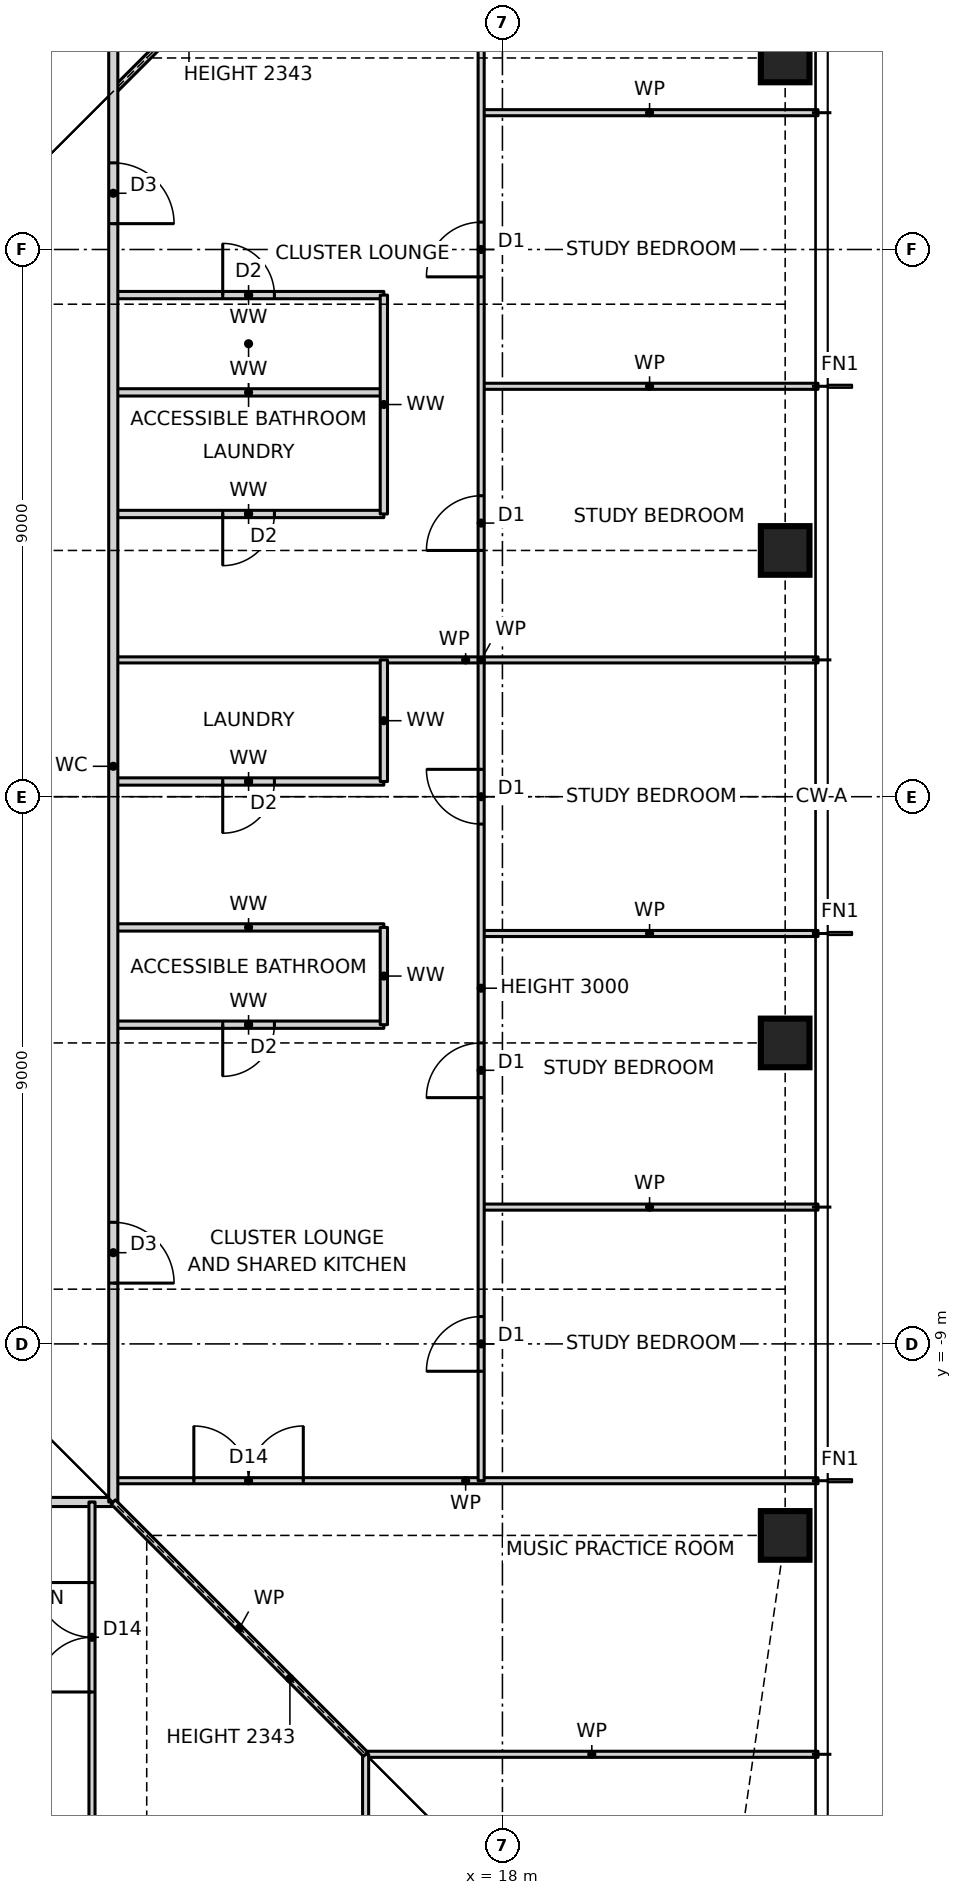
"""IFC4 building model, lengths in metres.
Left out: names, types, materials, properties, quantities, classifications, styles, units other than length and angle.
Written with IfcOpenShell. Run it as: python <this file> out.ifc"""

import sys

from ifc_helpers import new_model, si_unit, direction, frame, frame_2d, origin, origin_2d, place, context, subcontext, project, spatial, rectangle, hollow_rectangle, extrude, element, fill, save


model = new_model("IFC4")
c1 = context("Model", 3, precision=1e-05, world=origin(), true_north=direction((0.0, 1.0)))
c2 = subcontext(c1, "Body", "Model", "MODEL_VIEW")
j1 = project(units=[si_unit("LENGTHUNIT", "METRE"), si_unit("PLANEANGLEUNIT", "RADIAN")], contexts=[c1])
p1 = place(None, origin())
s1 = spatial("IfcSite", under=j1, at=p1, CompositionType="ELEMENT")
p2 = place(p1, origin())
s2 = spatial("IfcBuilding", under=s1, at=p2, CompositionType="ELEMENT")
p3 = place(p2, frame((0.0, 0.0, 36.0)))
s3 = spatial("IfcBuildingStorey", under=s2, at=p3, CompositionType="ELEMENT", Elevation=36.0)
for number, where, z_axis, x_axis in (
    (1, (22.65, -12.15, 0.0), (0.0, 0.0, 1.0), (1.0, 0.0, 0.0)),
    (2, (22.65, -4.05, 0.0), (0.0, 0.0, 1.0), (1.0, 0.0, 0.0)),
    (3, (22.65, 4.05, 0.0), (0.0, 0.0, 1.0), (1.0, 0.0, 0.0)),
    (4, (22.65, 12.15, 0.0), (0.0, 0.0, 1.0), (1.0, 0.0, 0.0)),
):
    element("IfcColumn", number, at=place(p3, frame(where, z_axis=z_axis, x_axis=x_axis)), inside=s3, PredefinedType="COLUMN", context=c2, shape_type="SweptSolid", body=[
        extrude(hollow_rectangle(XDim=0.8, YDim=0.8, WallThickness=0.09, at=origin_2d()), origin(), (0.0, 0.0, 1.0), 3.5),
    ])
p4 = place(p3, frame((15.75, -15.75, 0.0), z_axis=(0.0, 0.0, 1.0), x_axis=(1.0, 0.0, 0.0)))
e5 = element("IfcWall", 5, at=p4, inside=s3, PredefinedType="PARTITIONING", context=c2, shape_type="SweptSolid", body=[
    extrude(rectangle(XDim=7.44, YDim=0.1, at=frame_2d((3.72, 0.0))), origin(), (0.0, 0.0, 1.0), 3.27),
])
p5 = place(p3, frame((-11.6, -11.6, 0.0), z_axis=(0.0, 0.0, 1.0), x_axis=(1.0, 0.0, 0.0)))
e6 = element("IfcWall", 6, at=p5, inside=s3, PredefinedType="PARTITIONING", context=c2, shape_type="SweptSolid", body=[
    extrude(rectangle(XDim=23.2, YDim=0.15, at=frame_2d((11.6, 0.0))), origin(), (0.0, 0.0, 1.0), 3.27),
])
p6 = place(p5, frame((2.975, 0.0, 0.0)))
e7 = element("IfcOpeningElement", 7, at=p6, cuts=e6, PredefinedType="OPENING", context=c2, shape_type="SweptSolid", body=[
    extrude(rectangle(XDim=1.0, YDim=2.1, at=frame_2d((0.5, 1.05))), frame((0.0, 0.085, 0.0), z_axis=(0.0, -1.0, 0.0), x_axis=(1.0, 0.0, 0.0)), (0.0, 0.0, 1.0), 0.17),
])
p7 = place(p5, frame((18.6, 0.0, 0.0)))
e8 = element("IfcOpeningElement", 8, at=p7, cuts=e6, PredefinedType="OPENING", context=c2, shape_type="SweptSolid", body=[
    extrude(rectangle(XDim=1.0, YDim=2.1, at=frame_2d((0.5, 1.05))), frame((0.0, 0.085, 0.0), z_axis=(0.0, -1.0, 0.0), x_axis=(1.0, 0.0, 0.0)), (0.0, 0.0, 1.0), 0.17),
])
p8 = place(p3, frame((11.6, -11.25, 0.0), z_axis=(0.0, 0.0, 1.0), x_axis=(1.0, 0.0, 0.0)))
e9 = element("IfcWall", 9, at=p8, inside=s3, PredefinedType="PARTITIONING", context=c2, shape_type="SweptSolid", body=[
    extrude(rectangle(XDim=11.59, YDim=0.1, at=frame_2d((5.795, 0.0))), origin(), (0.0, 0.0, 1.0), 3.27),
])
p9 = place(p8, frame((1.325, 0.0, 0.0)))
e10 = element("IfcOpeningElement", 10, at=p9, cuts=e9, PredefinedType="OPENING", context=c2, shape_type="SweptSolid", body=[
    extrude(rectangle(XDim=1.8, YDim=2.1, at=frame_2d((0.9, 1.05))), frame((0.0, 0.06, 0.0), z_axis=(0.0, -1.0, 0.0), x_axis=(1.0, 0.0, 0.0)), (0.0, 0.0, 1.0), 0.12),
])
p10 = place(p3, frame((17.65, -6.75, 0.0), z_axis=(0.0, 0.0, 1.0), x_axis=(1.0, 0.0, 0.0)))
e11 = element("IfcWall", 11, at=p10, inside=s3, PredefinedType="PARTITIONING", context=c2, shape_type="SweptSolid", body=[
    extrude(rectangle(XDim=5.54, YDim=0.1, at=frame_2d((2.77, 0.0))), origin(), (0.0, 0.0, 1.0), 3.27),
])
p11 = place(p3, frame((11.6, -3.75, 0.0), z_axis=(0.0, 0.0, 1.0), x_axis=(1.0, 0.0, 0.0)))
e12 = element("IfcWall", 12, at=p11, inside=s3, PredefinedType="PARTITIONING", context=c2, shape_type="SweptSolid", body=[
    extrude(rectangle(XDim=4.45, YDim=0.12, at=frame_2d((2.225, 0.0))), origin(), (0.0, 0.0, 1.0), 3.27),
])
p12 = place(p11, frame((1.8, 0.0, 0.0)))
e13 = element("IfcOpeningElement", 13, at=p12, cuts=e12, PredefinedType="OPENING", context=c2, shape_type="SweptSolid", body=[
    extrude(rectangle(XDim=0.85, YDim=2.1, at=frame_2d((0.425, 1.05))), frame((0.0, 0.07, 0.0), z_axis=(0.0, -1.0, 0.0), x_axis=(1.0, 0.0, 0.0)), (0.0, 0.0, 1.0), 0.14),
])
p13 = place(p3, frame((17.65, -2.25, 0.0), z_axis=(0.0, 0.0, 1.0), x_axis=(1.0, 0.0, 0.0)))
e14 = element("IfcWall", 14, at=p13, inside=s3, PredefinedType="PARTITIONING", context=c2, shape_type="SweptSolid", body=[
    extrude(rectangle(XDim=5.54, YDim=0.1, at=frame_2d((2.77, 0.0))), origin(), (0.0, 0.0, 1.0), 3.27),
])
p14 = place(p3, frame((11.6, -2.15, 0.0), z_axis=(0.0, 0.0, 1.0), x_axis=(1.0, 0.0, 0.0)))
e15 = element("IfcWall", 15, at=p14, inside=s3, PredefinedType="PARTITIONING", context=c2, shape_type="SweptSolid", body=[
    extrude(rectangle(XDim=4.45, YDim=0.12, at=frame_2d((2.225, 0.0))), origin(), (0.0, 0.0, 1.0), 3.27),
])
p15 = place(p3, frame((11.6, 0.25, 0.0), z_axis=(0.0, 0.0, 1.0), x_axis=(1.0, 0.0, 0.0)))
e16 = element("IfcWall", 16, at=p15, inside=s3, PredefinedType="PARTITIONING", context=c2, shape_type="SweptSolid", body=[
    extrude(rectangle(XDim=4.45, YDim=0.12, at=frame_2d((2.225, 0.0))), origin(), (0.0, 0.0, 1.0), 3.27),
])
p16 = place(p15, frame((1.8, 0.0, 0.0)))
e17 = element("IfcOpeningElement", 17, at=p16, cuts=e16, PredefinedType="OPENING", context=c2, shape_type="SweptSolid", body=[
    extrude(rectangle(XDim=0.85, YDim=2.1, at=frame_2d((0.425, 1.05))), frame((0.0, 0.07, 0.0), z_axis=(0.0, -1.0, 0.0), x_axis=(1.0, 0.0, 0.0)), (0.0, 0.0, 1.0), 0.14),
])
p17 = place(p3, frame((11.6, 2.25, 0.0), z_axis=(0.0, 0.0, 1.0), x_axis=(1.0, 0.0, 0.0)))
e18 = element("IfcWall", 18, at=p17, inside=s3, PredefinedType="PARTITIONING", context=c2, shape_type="SweptSolid", body=[
    extrude(rectangle(XDim=11.59, YDim=0.1, at=frame_2d((5.795, 0.0))), origin(), (0.0, 0.0, 1.0), 3.27),
])
p18 = place(p3, frame((11.6, 4.65, 0.0), z_axis=(0.0, 0.0, 1.0), x_axis=(1.0, 0.0, 0.0)))
e19 = element("IfcWall", 19, at=p18, inside=s3, PredefinedType="PARTITIONING", context=c2, shape_type="SweptSolid", body=[
    extrude(rectangle(XDim=4.45, YDim=0.12, at=frame_2d((2.225, 0.0))), origin(), (0.0, 0.0, 1.0), 3.27),
])
p19 = place(p18, frame((1.8, 0.0, 0.0)))
e20 = element("IfcOpeningElement", 20, at=p19, cuts=e19, PredefinedType="OPENING", context=c2, shape_type="SweptSolid", body=[
    extrude(rectangle(XDim=0.85, YDim=2.1, at=frame_2d((0.425, 1.05))), frame((0.0, 0.07, 0.0), z_axis=(0.0, -1.0, 0.0), x_axis=(1.0, 0.0, 0.0)), (0.0, 0.0, 1.0), 0.14),
])
p20 = place(p3, frame((11.6, 6.65, 0.0), z_axis=(0.0, 0.0, 1.0), x_axis=(1.0, 0.0, 0.0)))
e21 = element("IfcWall", 21, at=p20, inside=s3, PredefinedType="PARTITIONING", context=c2, shape_type="SweptSolid", body=[
    extrude(rectangle(XDim=4.45, YDim=0.12, at=frame_2d((2.225, 0.0))), origin(), (0.0, 0.0, 1.0), 3.27),
])
p21 = place(p3, frame((17.65, 6.75, 0.0), z_axis=(0.0, 0.0, 1.0), x_axis=(1.0, 0.0, 0.0)))
e22 = element("IfcWall", 22, at=p21, inside=s3, PredefinedType="PARTITIONING", context=c2, shape_type="SweptSolid", body=[
    extrude(rectangle(XDim=5.54, YDim=0.1, at=frame_2d((2.77, 0.0))), origin(), (0.0, 0.0, 1.0), 3.27),
])
p22 = place(p3, frame((11.6, 8.25, 0.0), z_axis=(0.0, 0.0, 1.0), x_axis=(1.0, 0.0, 0.0)))
e23 = element("IfcWall", 23, at=p22, inside=s3, PredefinedType="PARTITIONING", context=c2, shape_type="SweptSolid", body=[
    extrude(rectangle(XDim=4.45, YDim=0.12, at=frame_2d((2.225, 0.0))), origin(), (0.0, 0.0, 1.0), 3.27),
])
p23 = place(p22, frame((1.8, 0.0, 0.0)))
e24 = element("IfcOpeningElement", 24, at=p23, cuts=e23, PredefinedType="OPENING", context=c2, shape_type="SweptSolid", body=[
    extrude(rectangle(XDim=0.85, YDim=2.1, at=frame_2d((0.425, 1.05))), frame((0.0, 0.07, 0.0), z_axis=(0.0, -1.0, 0.0), x_axis=(1.0, 0.0, 0.0)), (0.0, 0.0, 1.0), 0.14),
])
p24 = place(p3, frame((17.65, 11.25, 0.0), z_axis=(0.0, 0.0, 1.0), x_axis=(1.0, 0.0, 0.0)))
e25 = element("IfcWall", 25, at=p24, inside=s3, PredefinedType="PARTITIONING", context=c2, shape_type="SweptSolid", body=[
    extrude(rectangle(XDim=5.54, YDim=0.1, at=frame_2d((2.77, 0.0))), origin(), (0.0, 0.0, 1.0), 3.27),
])
p25 = place(p3, frame((11.6, 11.6, 0.0), z_axis=(0.0, 0.0, 1.0), x_axis=(0.707106781187, 0.707106781187, 0.0)))
e26 = element("IfcWall", 26, at=p25, inside=s3, PredefinedType="PARTITIONING", context=c2, shape_type="SweptSolid", body=[
    extrude(rectangle(XDim=5.869, YDim=0.1, at=frame_2d((2.935, 0.0))), origin(), (0.0, 0.0, 1.0), 2.343),
])
p26 = place(p3, frame((17.65, -11.25, 0.0), z_axis=(0.0, 0.0, 1.0), x_axis=(0.0, 1.0, 0.0)))
e27 = element("IfcWall", 27, at=p26, inside=s3, PredefinedType="PARTITIONING", context=c2, shape_type="SweptSolid", body=[
    extrude(rectangle(XDim=27.0, YDim=0.1, at=frame_2d((13.5, 0.0))), origin(), (0.0, 0.0, 1.0), 3.0),
])
p27 = place(p26, frame((1.8, 0.0, 0.0)))
e28 = element("IfcOpeningElement", 28, at=p27, cuts=e27, PredefinedType="OPENING", context=c2, shape_type="SweptSolid", body=[
    extrude(rectangle(XDim=0.9, YDim=2.1, at=frame_2d((0.45, 1.05))), frame((0.0, 0.06, 0.0), z_axis=(0.0, -1.0, 0.0), x_axis=(1.0, 0.0, 0.0)), (0.0, 0.0, 1.0), 0.12),
])
p28 = place(p26, frame((6.3, 0.0, 0.0)))
e29 = element("IfcOpeningElement", 29, at=p28, cuts=e27, PredefinedType="OPENING", context=c2, shape_type="SweptSolid", body=[
    extrude(rectangle(XDim=0.9, YDim=2.1, at=frame_2d((0.45, 1.05))), frame((0.0, 0.06, 0.0), z_axis=(0.0, -1.0, 0.0), x_axis=(1.0, 0.0, 0.0)), (0.0, 0.0, 1.0), 0.12),
])
p29 = place(p26, frame((10.8, 0.0, 0.0)))
e30 = element("IfcOpeningElement", 30, at=p29, cuts=e27, PredefinedType="OPENING", context=c2, shape_type="SweptSolid", body=[
    extrude(rectangle(XDim=0.9, YDim=2.1, at=frame_2d((0.45, 1.05))), frame((0.0, 0.06, 0.0), z_axis=(0.0, -1.0, 0.0), x_axis=(1.0, 0.0, 0.0)), (0.0, 0.0, 1.0), 0.12),
])
p30 = place(p26, frame((15.3, 0.0, 0.0)))
e31 = element("IfcOpeningElement", 31, at=p30, cuts=e27, PredefinedType="OPENING", context=c2, shape_type="SweptSolid", body=[
    extrude(rectangle(XDim=0.9, YDim=2.1, at=frame_2d((0.45, 1.05))), frame((0.0, 0.06, 0.0), z_axis=(0.0, -1.0, 0.0), x_axis=(1.0, 0.0, 0.0)), (0.0, 0.0, 1.0), 0.12),
])
p31 = place(p26, frame((19.8, 0.0, 0.0)))
e32 = element("IfcOpeningElement", 32, at=p31, cuts=e27, PredefinedType="OPENING", context=c2, shape_type="SweptSolid", body=[
    extrude(rectangle(XDim=0.9, YDim=2.1, at=frame_2d((0.45, 1.05))), frame((0.0, 0.06, 0.0), z_axis=(0.0, -1.0, 0.0), x_axis=(1.0, 0.0, 0.0)), (0.0, 0.0, 1.0), 0.12),
])
p32 = place(p26, frame((24.3, 0.0, 0.0)))
e33 = element("IfcOpeningElement", 33, at=p32, cuts=e27, PredefinedType="OPENING", context=c2, shape_type="SweptSolid", body=[
    extrude(rectangle(XDim=0.9, YDim=2.1, at=frame_2d((0.45, 1.05))), frame((0.0, 0.06, 0.0), z_axis=(0.0, -1.0, 0.0), x_axis=(1.0, 0.0, 0.0)), (0.0, 0.0, 1.0), 0.12),
])
p33 = place(p3, frame((16.05, -3.75, 0.0), z_axis=(0.0, 0.0, 1.0), x_axis=(0.0, 1.0, 0.0)))
e34 = element("IfcWall", 34, at=p33, inside=s3, PredefinedType="PARTITIONING", context=c2, shape_type="SweptSolid", body=[
    extrude(rectangle(XDim=1.6, YDim=0.12, at=frame_2d((0.8, 0.0))), origin(), (0.0, 0.0, 1.0), 3.27),
])
p34 = place(p3, frame((16.05, 0.25, 0.0), z_axis=(0.0, 0.0, 1.0), x_axis=(0.0, 1.0, 0.0)))
e35 = element("IfcWall", 35, at=p34, inside=s3, PredefinedType="PARTITIONING", context=c2, shape_type="SweptSolid", body=[
    extrude(rectangle(XDim=2.0, YDim=0.12, at=frame_2d((1.0, 0.0))), origin(), (0.0, 0.0, 1.0), 3.27),
])
p35 = place(p3, frame((16.05, 4.65, 0.0), z_axis=(0.0, 0.0, 1.0), x_axis=(0.0, 1.0, 0.0)))
e36 = element("IfcWall", 36, at=p35, inside=s3, PredefinedType="PARTITIONING", context=c2, shape_type="SweptSolid", body=[
    extrude(rectangle(XDim=3.6, YDim=0.12, at=frame_2d((1.8, 0.0))), origin(), (0.0, 0.0, 1.0), 3.27),
])
p36 = place(p3, frame((15.75, -23.19, 0.0), z_axis=(0.0, 0.0, 1.0), x_axis=(0.0, 1.0, 0.0)))
e37 = element("IfcWall", 37, at=p36, inside=s3, PredefinedType="PARTITIONING", context=c2, shape_type="SweptSolid", body=[
    extrude(rectangle(XDim=7.44, YDim=0.1, at=frame_2d((3.72, 0.0))), origin(), (0.0, 0.0, 1.0), 3.27),
])
p37 = place(p36, frame((3.295, 0.0, 0.0)))
e38 = element("IfcOpeningElement", 38, at=p37, cuts=e37, PredefinedType="OPENING", context=c2, shape_type="SweptSolid", body=[
    extrude(rectangle(XDim=0.85, YDim=2.1, at=frame_2d((0.425, 1.05))), frame((0.0, 0.06, 0.0), z_axis=(0.0, -1.0, 0.0), x_axis=(1.0, 0.0, 0.0)), (0.0, 0.0, 1.0), 0.12),
])
p38 = place(p3, frame((11.6, -11.6, 0.0), z_axis=(0.0, 0.0, 1.0), x_axis=(0.0, 1.0, 0.0)))
e39 = element("IfcWall", 39, at=p38, inside=s3, PredefinedType="PARTITIONING", context=c2, shape_type="SweptSolid", body=[
    extrude(rectangle(XDim=24.2, YDim=0.15, at=frame_2d((12.1, 0.0))), origin(), (0.0, 0.0, 1.0), 3.27),
])
p39 = place(p38, frame((3.6, 0.0, 0.0)))
e40 = element("IfcOpeningElement", 40, at=p39, cuts=e39, PredefinedType="OPENING", context=c2, shape_type="SweptSolid", body=[
    extrude(rectangle(XDim=1.0, YDim=2.1, at=frame_2d((0.5, 1.05))), frame((0.0, 0.085, 0.0), z_axis=(0.0, -1.0, 0.0), x_axis=(1.0, 0.0, 0.0)), (0.0, 0.0, 1.0), 0.17),
])
p40 = place(p38, frame((21.025, 0.0, 0.0)))
e41 = element("IfcOpeningElement", 41, at=p40, cuts=e39, PredefinedType="OPENING", context=c2, shape_type="SweptSolid", body=[
    extrude(rectangle(XDim=1.0, YDim=2.1, at=frame_2d((0.5, 1.05))), frame((0.0, 0.085, 0.0), z_axis=(0.0, -1.0, 0.0), x_axis=(1.0, 0.0, 0.0)), (0.0, 0.0, 1.0), 0.17),
])
p41 = place(p3, frame((11.25, -23.19, 0.0), z_axis=(0.0, 0.0, 1.0), x_axis=(0.0, 1.0, 0.0)))
e42 = element("IfcWall", 42, at=p41, inside=s3, PredefinedType="PARTITIONING", context=c2, shape_type="SweptSolid", body=[
    extrude(rectangle(XDim=11.59, YDim=0.1, at=frame_2d((5.795, 0.0))), origin(), (0.0, 0.0, 1.0), 3.27),
])
p42 = place(p41, frame((8.465, 0.0, 0.0)))
e43 = element("IfcOpeningElement", 43, at=p42, cuts=e42, PredefinedType="OPENING", context=c2, shape_type="SweptSolid", body=[
    extrude(rectangle(XDim=1.8, YDim=2.1, at=frame_2d((0.9, 1.05))), frame((0.0, 0.06, 0.0), z_axis=(0.0, -1.0, 0.0), x_axis=(1.0, 0.0, 0.0)), (0.0, 0.0, 1.0), 0.12),
])
p43 = place(p3, frame((15.75, -15.75, 0.0), z_axis=(0.0, 0.0, 1.0), x_axis=(-0.707106781187, 0.707106781187, 0.0)))
e44 = element("IfcWall", 44, at=p43, inside=s3, PredefinedType="PARTITIONING", context=c2, shape_type="SweptSolid", body=[
    extrude(rectangle(XDim=5.869, YDim=0.1, at=frame_2d((2.935, 0.0))), origin(), (0.0, 0.0, 1.0), 2.343),
])
p44 = place(p42, origin())
e45 = element("IfcDoor", 45, at=p44, inside=s3, OperationType="DOUBLE_DOOR_SINGLE_SWING", PredefinedType="DOOR", context=c2, shape_type="SweptSolid", body=[
    extrude(rectangle(XDim=1.8, YDim=2.1, at=frame_2d((0.9, 1.05))), frame((0.0, 0.025, 0.0), z_axis=(0.0, -1.0, 0.0), x_axis=(1.0, 0.0, 0.0)), (0.0, 0.0, 1.0), 0.05),
])
fill(e43, e45)
p45 = place(p9, origin())
e46 = element("IfcDoor", 46, at=p45, inside=s3, OperationType="DOUBLE_DOOR_SINGLE_SWING", PredefinedType="DOOR", context=c2, shape_type="SweptSolid", body=[
    extrude(rectangle(XDim=1.8, YDim=2.1, at=frame_2d((0.9, 1.05))), frame((0.0, 0.025, 0.0), z_axis=(0.0, -1.0, 0.0), x_axis=(1.0, 0.0, 0.0)), (0.0, 0.0, 1.0), 0.05),
])
fill(e10, e46)
p46 = place(p27, origin())
e47 = element("IfcDoor", 47, at=p46, inside=s3, OperationType="SINGLE_SWING_LEFT", PredefinedType="DOOR", context=c2, shape_type="SweptSolid", body=[
    extrude(rectangle(XDim=0.9, YDim=2.1, at=frame_2d((0.45, 1.05))), frame((0.0, 0.025, 0.0), z_axis=(0.0, -1.0, 0.0), x_axis=(1.0, 0.0, 0.0)), (0.0, 0.0, 1.0), 0.05),
])
fill(e28, e47)
p47 = place(p28, origin())
e48 = element("IfcDoor", 48, at=p47, inside=s3, OperationType="SINGLE_SWING_LEFT", PredefinedType="DOOR", context=c2, shape_type="SweptSolid", body=[
    extrude(rectangle(XDim=0.9, YDim=2.1, at=frame_2d((0.45, 1.05))), frame((0.0, 0.025, 0.0), z_axis=(0.0, -1.0, 0.0), x_axis=(1.0, 0.0, 0.0)), (0.0, 0.0, 1.0), 0.05),
])
fill(e29, e48)
p48 = place(p29, origin())
e49 = element("IfcDoor", 49, at=p48, inside=s3, OperationType="SINGLE_SWING_RIGHT", PredefinedType="DOOR", context=c2, shape_type="SweptSolid", body=[
    extrude(rectangle(XDim=0.9, YDim=2.1, at=frame_2d((0.45, 1.05))), frame((0.0, 0.025, 0.0), z_axis=(0.0, -1.0, 0.0), x_axis=(1.0, 0.0, 0.0)), (0.0, 0.0, 1.0), 0.05),
])
fill(e30, e49)
p49 = place(p39, frame((1.0, 0.0, 0.0), z_axis=(0.0, 0.0, 1.0), x_axis=(-1.0, 0.0, 0.0)))
e50 = element("IfcDoor", 50, at=p49, inside=s3, OperationType="SINGLE_SWING_RIGHT", PredefinedType="DOOR", context=c2, shape_type="SweptSolid", body=[
    extrude(rectangle(XDim=1.0, YDim=2.1, at=frame_2d((0.5, 1.05))), frame((0.0, 0.025, 0.0), z_axis=(0.0, -1.0, 0.0), x_axis=(1.0, 0.0, 0.0)), (0.0, 0.0, 1.0), 0.05),
])
fill(e40, e50)
p50 = place(p12, frame((0.85, 0.0, 0.0), z_axis=(0.0, 0.0, 1.0), x_axis=(-1.0, 0.0, 0.0)))
e51 = element("IfcDoor", 51, at=p50, inside=s3, OperationType="SINGLE_SWING_RIGHT", PredefinedType="DOOR", context=c2, shape_type="SweptSolid", body=[
    extrude(rectangle(XDim=0.85, YDim=2.1, at=frame_2d((0.425, 1.05))), frame((0.0, 0.025, 0.0), z_axis=(0.0, -1.0, 0.0), x_axis=(1.0, 0.0, 0.0)), (0.0, 0.0, 1.0), 0.05),
])
fill(e13, e51)
p51 = place(p16, frame((0.85, 0.0, 0.0), z_axis=(0.0, 0.0, 1.0), x_axis=(-1.0, 0.0, 0.0)))
e52 = element("IfcDoor", 52, at=p51, inside=s3, OperationType="SINGLE_SWING_RIGHT", PredefinedType="DOOR", context=c2, shape_type="SweptSolid", body=[
    extrude(rectangle(XDim=0.85, YDim=2.1, at=frame_2d((0.425, 1.05))), frame((0.0, 0.025, 0.0), z_axis=(0.0, -1.0, 0.0), x_axis=(1.0, 0.0, 0.0)), (0.0, 0.0, 1.0), 0.05),
])
fill(e17, e52)
p52 = place(p30, origin())
e53 = element("IfcDoor", 53, at=p52, inside=s3, OperationType="SINGLE_SWING_LEFT", PredefinedType="DOOR", context=c2, shape_type="SweptSolid", body=[
    extrude(rectangle(XDim=0.9, YDim=2.1, at=frame_2d((0.45, 1.05))), frame((0.0, 0.025, 0.0), z_axis=(0.0, -1.0, 0.0), x_axis=(1.0, 0.0, 0.0)), (0.0, 0.0, 1.0), 0.05),
])
fill(e31, e53)
p53 = place(p31, origin())
e54 = element("IfcDoor", 54, at=p53, inside=s3, OperationType="SINGLE_SWING_LEFT", PredefinedType="DOOR", context=c2, shape_type="SweptSolid", body=[
    extrude(rectangle(XDim=0.9, YDim=2.1, at=frame_2d((0.45, 1.05))), frame((0.0, 0.025, 0.0), z_axis=(0.0, -1.0, 0.0), x_axis=(1.0, 0.0, 0.0)), (0.0, 0.0, 1.0), 0.05),
])
fill(e32, e54)
p54 = place(p40, frame((1.0, 0.0, 0.0), z_axis=(0.0, 0.0, 1.0), x_axis=(-1.0, 0.0, 0.0)))
e55 = element("IfcDoor", 55, at=p54, inside=s3, OperationType="SINGLE_SWING_RIGHT", PredefinedType="DOOR", context=c2, shape_type="SweptSolid", body=[
    extrude(rectangle(XDim=1.0, YDim=2.1, at=frame_2d((0.5, 1.05))), frame((0.0, 0.025, 0.0), z_axis=(0.0, -1.0, 0.0), x_axis=(1.0, 0.0, 0.0)), (0.0, 0.0, 1.0), 0.05),
])
fill(e41, e55)
p55 = place(p19, frame((0.85, 0.0, 0.0), z_axis=(0.0, 0.0, 1.0), x_axis=(-1.0, 0.0, 0.0)))
e56 = element("IfcDoor", 56, at=p55, inside=s3, OperationType="SINGLE_SWING_RIGHT", PredefinedType="DOOR", context=c2, shape_type="SweptSolid", body=[
    extrude(rectangle(XDim=0.85, YDim=2.1, at=frame_2d((0.425, 1.05))), frame((0.0, 0.025, 0.0), z_axis=(0.0, -1.0, 0.0), x_axis=(1.0, 0.0, 0.0)), (0.0, 0.0, 1.0), 0.05),
])
fill(e20, e56)
p56 = place(p23, origin())
e57 = element("IfcDoor", 57, at=p56, inside=s3, OperationType="SINGLE_SWING_LEFT", PredefinedType="DOOR", context=c2, shape_type="SweptSolid", body=[
    extrude(rectangle(XDim=0.85, YDim=2.1, at=frame_2d((0.425, 1.05))), frame((0.0, 0.025, 0.0), z_axis=(0.0, -1.0, 0.0), x_axis=(1.0, 0.0, 0.0)), (0.0, 0.0, 1.0), 0.05),
])
fill(e24, e57)
save(model, sys.argv[1])
